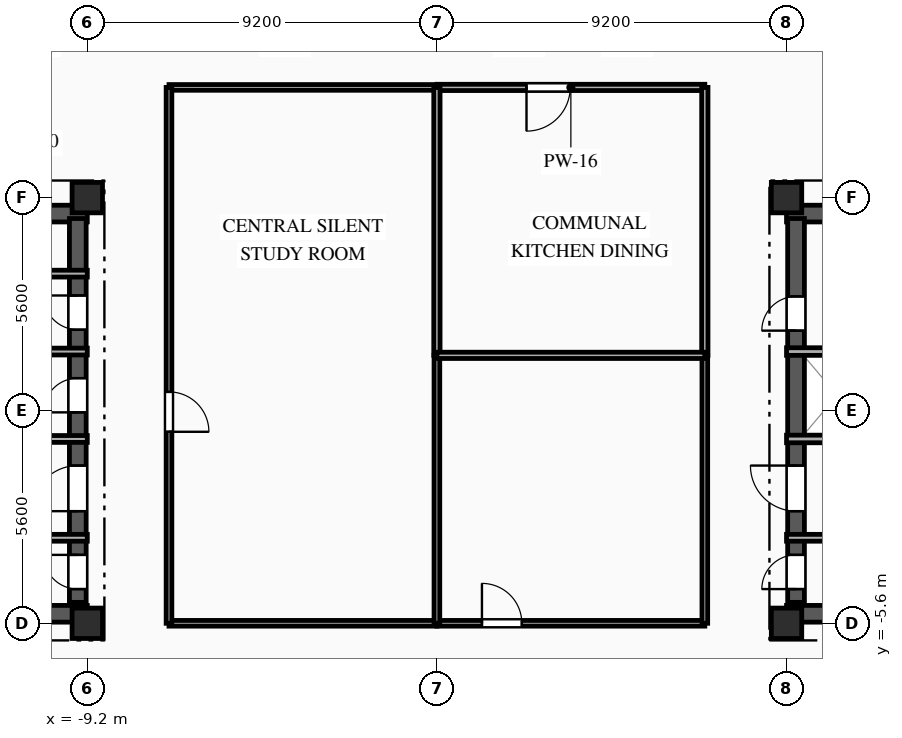
"""IFC4 building model, lengths in metres.
Left out: names, types, materials, properties, quantities, classifications, styles, units other than length and angle.
Written with IfcOpenShell. Run it as: python <this file> out.ifc"""

import sys

from ifc_helpers import new_model, si_unit, direction, frame, frame_2d, origin, origin_2d, place, context, subcontext, project, spatial, rectangle, extrude, element, fill, save


model = new_model("IFC4")
c1 = context("Model", 3, precision=1e-05, world=origin(), true_north=direction((0.0, 1.0)))
c2 = subcontext(c1, "Body", "Model", "MODEL_VIEW")
j1 = project(units=[si_unit("LENGTHUNIT", "METRE"), si_unit("PLANEANGLEUNIT", "RADIAN")], contexts=[c1])
p1 = place(None, origin())
s1 = spatial("IfcSite", under=j1, at=p1, CompositionType="ELEMENT")
p2 = place(p1, origin())
s2 = spatial("IfcBuilding", under=s1, at=p2, CompositionType="ELEMENT")
p3 = place(p2, frame((0.0, 0.0, 248.4)))
s3 = spatial("IfcBuildingStorey", under=s2, at=p3, CompositionType="ELEMENT", Elevation=248.4)
for number, where, z_axis, x_axis in (
    (1, (-9.2, -5.6, 0.0), (0.0, 0.0, 1.0), (1.0, 0.0, 0.0)),
    (2, (-9.2, 5.6, 0.0), (0.0, 0.0, 1.0), (1.0, 0.0, 0.0)),
    (3, (9.2, -5.6, 0.0), (0.0, 0.0, 1.0), (1.0, 0.0, 0.0)),
    (4, (9.2, 5.6, 0.0), (0.0, 0.0, 1.0), (1.0, 0.0, 0.0)),
):
    element("IfcColumn", number, at=place(p3, frame(where, z_axis=z_axis, x_axis=x_axis)), inside=s3, PredefinedType="COLUMN", context=c2, shape_type="SweptSolid", body=[
        extrude(rectangle(XDim=0.8, YDim=0.8, at=origin_2d()), origin(), (0.0, 0.0, 1.0), 3.35),
    ])
p4 = place(p3, frame((-18.8, 5.18, 0.0), z_axis=(0.0, 0.0, 1.0), x_axis=(1.0, 0.0, 0.0)))
e5 = element("IfcWall", 5, at=p4, inside=s3, PredefinedType="SHEAR", context=c2, shape_type="SweptSolid", body=[
    extrude(rectangle(XDim=9.6, YDim=0.44, at=frame_2d((4.8, 0.0))), origin(), (0.0, 0.0, 1.0), 3.04),
])
p5 = place(p4, frame((1.55, 0.0, 0.0)))
e6 = element("IfcOpeningElement", 6, at=p5, cuts=e5, PredefinedType="OPENING", context=c2, shape_type="SweptSolid", body=[
    extrude(rectangle(XDim=1.1, YDim=2.15, at=frame_2d((0.55, 1.075))), frame((0.0, 0.23, 0.0), z_axis=(0.0, -1.0, 0.0), x_axis=(1.0, 0.0, 0.0)), (0.0, 0.0, 1.0), 0.46),
])
p6 = place(p4, frame((4.775, 0.0, 0.0)))
e7 = element("IfcOpeningElement", 7, at=p6, cuts=e5, PredefinedType="OPENING", context=c2, shape_type="SweptSolid", body=[
    extrude(rectangle(XDim=1.05, YDim=2.1, at=frame_2d((0.525, 1.05))), frame((0.0, 0.23, 0.0), z_axis=(0.0, -1.0, 0.0), x_axis=(1.0, 0.0, 0.0)), (0.0, 0.0, 1.0), 0.46),
])
p7 = place(p3, frame((-18.8, -5.35, 0.0), z_axis=(0.0, 0.0, 1.0), x_axis=(1.0, 0.0, 0.0)))
e8 = element("IfcWall", 8, at=p7, inside=s3, PredefinedType="SHEAR", context=c2, shape_type="SweptSolid", body=[
    extrude(rectangle(XDim=9.6, YDim=0.44, at=frame_2d((4.8, 0.0))), origin(), (0.0, 0.0, 1.0), 3.04),
])
p8 = place(p7, frame((1.05, 0.0, 0.0)))
e9 = element("IfcOpeningElement", 9, at=p8, cuts=e8, PredefinedType="OPENING", context=c2, shape_type="SweptSolid", body=[
    extrude(rectangle(XDim=0.9, YDim=2.1, at=frame_2d((0.45, 1.05))), frame((0.0, 0.23, 0.0), z_axis=(0.0, -1.0, 0.0), x_axis=(1.0, 0.0, 0.0)), (0.0, 0.0, 1.0), 0.46),
])
p9 = place(p3, frame((-9.45, -5.05, 0.0), z_axis=(0.0, 0.0, 1.0), x_axis=(0.0, 1.0, 0.0)))
e10 = element("IfcWall", 10, at=p9, inside=s3, PredefinedType="SHEAR", context=c2, shape_type="SweptSolid", body=[
    extrude(rectangle(XDim=10.1, YDim=0.44, at=frame_2d((5.05, 0.0))), origin(), (0.0, 0.0, 1.0), 3.04),
])
p10 = place(p9, frame((7.175, 0.0, 0.0)))
e11 = element("IfcOpeningElement", 11, at=p10, cuts=e10, PredefinedType="OPENING", context=c2, shape_type="SweptSolid", body=[
    extrude(rectangle(XDim=0.9, YDim=2.1, at=frame_2d((0.45, 1.05))), frame((0.0, 0.23, 0.0), z_axis=(0.0, -1.0, 0.0), x_axis=(1.0, 0.0, 0.0)), (0.0, 0.0, 1.0), 0.46),
])
p11 = place(p9, frame((2.4, 0.0, 0.0)))
e12 = element("IfcOpeningElement", 12, at=p11, cuts=e10, PredefinedType="OPENING", context=c2, shape_type="SweptSolid", body=[
    extrude(rectangle(XDim=1.2, YDim=2.15, at=frame_2d((0.6, 1.075))), frame((0.0, 0.23, 0.0), z_axis=(0.0, -1.0, 0.0), x_axis=(1.0, 0.0, 0.0)), (0.0, 0.0, 1.0), 0.46),
])
p12 = place(p9, frame((0.35, 0.0, 0.0)))
e13 = element("IfcOpeningElement", 13, at=p12, cuts=e10, PredefinedType="OPENING", context=c2, shape_type="SweptSolid", body=[
    extrude(rectangle(XDim=0.9, YDim=2.1, at=frame_2d((0.45, 1.05))), frame((0.0, 0.23, 0.0), z_axis=(0.0, -1.0, 0.0), x_axis=(1.0, 0.0, 0.0)), (0.0, 0.0, 1.0), 0.46),
])
p13 = place(p9, frame((5.0, 0.0, 0.0)))
e14 = element("IfcOpeningElement", 14, at=p13, cuts=e10, PredefinedType="OPENING", context=c2, shape_type="SweptSolid", body=[
    extrude(rectangle(XDim=0.9, YDim=2.1, at=frame_2d((0.45, 1.05))), frame((0.0, 0.23, 0.0), z_axis=(0.0, -1.0, 0.0), x_axis=(1.0, 0.0, 0.0)), (0.0, 0.0, 1.0), 0.46),
])
p14 = place(p3, frame((9.2, 5.18, 0.0), z_axis=(0.0, 0.0, 1.0), x_axis=(1.0, 0.0, 0.0)))
e15 = element("IfcWall", 15, at=p14, inside=s3, PredefinedType="SHEAR", context=c2, shape_type="SweptSolid", body=[
    extrude(rectangle(XDim=9.6, YDim=0.44, at=frame_2d((4.8, 0.0))), origin(), (0.0, 0.0, 1.0), 3.04),
])
p15 = place(p14, frame((6.95, 0.0, 0.0)))
e16 = element("IfcOpeningElement", 16, at=p15, cuts=e15, PredefinedType="OPENING", context=c2, shape_type="SweptSolid", body=[
    extrude(rectangle(XDim=1.1, YDim=2.15, at=frame_2d((0.55, 1.075))), frame((0.0, 0.23, 0.0), z_axis=(0.0, -1.0, 0.0), x_axis=(1.0, 0.0, 0.0)), (0.0, 0.0, 1.0), 0.46),
])
p16 = place(p14, frame((3.775, 0.0, 0.0)))
e17 = element("IfcOpeningElement", 17, at=p16, cuts=e15, PredefinedType="OPENING", context=c2, shape_type="SweptSolid", body=[
    extrude(rectangle(XDim=1.05, YDim=2.1, at=frame_2d((0.525, 1.05))), frame((0.0, 0.23, 0.0), z_axis=(0.0, -1.0, 0.0), x_axis=(1.0, 0.0, 0.0)), (0.0, 0.0, 1.0), 0.46),
])
p17 = place(p3, frame((9.2, -5.35, 0.0), z_axis=(0.0, 0.0, 1.0), x_axis=(1.0, 0.0, 0.0)))
e18 = element("IfcWall", 18, at=p17, inside=s3, PredefinedType="SHEAR", context=c2, shape_type="SweptSolid", body=[
    extrude(rectangle(XDim=9.6, YDim=0.44, at=frame_2d((4.8, 0.0))), origin(), (0.0, 0.0, 1.0), 3.04),
])
p18 = place(p17, frame((7.65, 0.0, 0.0)))
e19 = element("IfcOpeningElement", 19, at=p18, cuts=e18, PredefinedType="OPENING", context=c2, shape_type="SweptSolid", body=[
    extrude(rectangle(XDim=0.9, YDim=2.1, at=frame_2d((0.45, 1.05))), frame((0.0, 0.23, 0.0), z_axis=(0.0, -1.0, 0.0), x_axis=(1.0, 0.0, 0.0)), (0.0, 0.0, 1.0), 0.46),
])
p19 = place(p3, frame((9.45, -5.05, 0.0), z_axis=(0.0, 0.0, 1.0), x_axis=(0.0, 1.0, 0.0)))
e20 = element("IfcWall", 20, at=p19, inside=s3, PredefinedType="SHEAR", context=c2, shape_type="SweptSolid", body=[
    extrude(rectangle(XDim=10.1, YDim=0.44, at=frame_2d((5.05, 0.0))), origin(), (0.0, 0.0, 1.0), 3.04),
])
p20 = place(p19, frame((7.15, 0.0, 0.0)))
e21 = element("IfcOpeningElement", 21, at=p20, cuts=e20, PredefinedType="OPENING", context=c2, shape_type="SweptSolid", body=[
    extrude(rectangle(XDim=0.9, YDim=2.1, at=frame_2d((0.45, 1.05))), frame((0.0, 0.23, 0.0), z_axis=(0.0, -1.0, 0.0), x_axis=(1.0, 0.0, 0.0)), (0.0, 0.0, 1.0), 0.46),
])
p21 = place(p19, frame((2.4, 0.0, 0.0)))
e22 = element("IfcOpeningElement", 22, at=p21, cuts=e20, PredefinedType="OPENING", context=c2, shape_type="SweptSolid", body=[
    extrude(rectangle(XDim=1.2, YDim=2.15, at=frame_2d((0.6, 1.075))), frame((0.0, 0.23, 0.0), z_axis=(0.0, -1.0, 0.0), x_axis=(1.0, 0.0, 0.0)), (0.0, 0.0, 1.0), 0.46),
])
p22 = place(p19, frame((0.35, 0.0, 0.0)))
e23 = element("IfcOpeningElement", 23, at=p22, cuts=e20, PredefinedType="OPENING", context=c2, shape_type="SweptSolid", body=[
    extrude(rectangle(XDim=0.9, YDim=2.1, at=frame_2d((0.45, 1.05))), frame((0.0, 0.23, 0.0), z_axis=(0.0, -1.0, 0.0), x_axis=(1.0, 0.0, 0.0)), (0.0, 0.0, 1.0), 0.46),
])
p23 = place(p3, frame((-9.2, 3.6, 0.0), z_axis=(0.0, 0.0, 1.0), x_axis=(-1.0, 0.0, 0.0)))
e24 = element("IfcWall", 24, at=p23, inside=s3, PredefinedType="PARTITIONING", context=c2, shape_type="SweptSolid", body=[
    extrude(rectangle(XDim=2.95, YDim=0.18, at=frame_2d((1.475, 0.0))), origin(), (0.0, 0.0, 1.0), 3.04),
])
p24 = place(p23, frame((1.7, 0.0, 0.0)))
e25 = element("IfcOpeningElement", 25, at=p24, cuts=e24, PredefinedType="OPENING", context=c2, shape_type="SweptSolid", body=[
    extrude(rectangle(XDim=0.9, YDim=2.1, at=frame_2d((0.45, 1.05))), frame((0.0, 0.1, 0.0), z_axis=(0.0, -1.0, 0.0), x_axis=(1.0, 0.0, 0.0)), (0.0, 0.0, 1.0), 0.2),
])
p25 = place(p3, frame((-12.15, 1.55, 0.0), z_axis=(0.0, 0.0, 1.0), x_axis=(1.0, 0.0, 0.0)))
e26 = element("IfcWall", 26, at=p25, inside=s3, PredefinedType="PARTITIONING", context=c2, shape_type="SweptSolid", body=[
    extrude(rectangle(XDim=2.95, YDim=0.18, at=frame_2d((1.475, 0.0))), origin(), (0.0, 0.0, 1.0), 3.04),
])
p26 = place(p3, frame((-15.05, -3.35, 0.0), z_axis=(0.0, 0.0, 1.0), x_axis=(1.0, 0.0, 0.0)))
e27 = element("IfcWall", 27, at=p26, inside=s3, PredefinedType="PARTITIONING", context=c2, shape_type="SweptSolid", body=[
    extrude(rectangle(XDim=5.85, YDim=0.18, at=frame_2d((2.925, 0.0))), origin(), (0.0, 0.0, 1.0), 2.755),
])
p27 = place(p3, frame((-9.2, -0.75, 0.0), z_axis=(0.0, 0.0, 1.0), x_axis=(-1.0, 0.0, 0.0)))
e28 = element("IfcWall", 28, at=p27, inside=s3, PredefinedType="PARTITIONING", context=c2, shape_type="SweptSolid", body=[
    extrude(rectangle(XDim=5.85, YDim=0.18, at=frame_2d((2.925, 0.0))), origin(), (0.0, 0.0, 1.0), 3.04),
])
p28 = place(p3, frame((9.2, -3.35, 0.0), z_axis=(0.0, 0.0, 1.0), x_axis=(1.0, 0.0, 0.0)))
e29 = element("IfcWall", 29, at=p28, inside=s3, PredefinedType="PARTITIONING", context=c2, shape_type="SweptSolid", body=[
    extrude(rectangle(XDim=5.82, YDim=0.18, at=frame_2d((2.91, 0.0))), origin(), (0.0, 0.0, 1.0), 2.755),
])
p29 = place(p3, frame((11.46, -0.75, 0.0), z_axis=(0.0, 0.0, 1.0), x_axis=(-1.0, 0.0, 0.0)))
e30 = element("IfcWall", 30, at=p29, inside=s3, PredefinedType="PARTITIONING", context=c2, shape_type="SweptSolid", body=[
    extrude(rectangle(XDim=2.26, YDim=0.2, at=frame_2d((1.13, 0.0))), origin(), (0.0, 0.0, 1.0), 3.04),
])
p30 = place(p3, frame((0.0, 8.5, 0.0), z_axis=(0.0, 0.0, 1.0), x_axis=(-1.0, 0.0, 0.0)))
e31 = element("IfcWall", 31, at=p30, inside=s3, PredefinedType="PARTITIONING", context=c2, shape_type="SweptSolid", body=[
    extrude(rectangle(XDim=7.05, YDim=0.15, at=frame_2d((3.525, 0.0))), origin(), (0.0, 0.0, 1.0), 3.04),
])
p31 = place(p3, frame((7.05, 8.5, 0.0), z_axis=(0.0, 0.0, 1.0), x_axis=(-1.0, 0.0, 0.0)))
e32 = element("IfcWall", 32, at=p31, inside=s3, PredefinedType="PARTITIONING", context=c2, shape_type="SweptSolid", body=[
    extrude(rectangle(XDim=7.05, YDim=0.165, at=frame_2d((3.525, 0.0))), origin(), (0.0, 0.0, 1.0), 3.04),
])
p32 = place(p31, frame((3.542, 0.0, 0.0)))
e33 = element("IfcOpeningElement", 33, at=p32, cuts=e32, PredefinedType="OPENING", context=c2, shape_type="SweptSolid", body=[
    extrude(rectangle(XDim=1.15, YDim=2.15, at=frame_2d((0.575, 1.075))), frame((0.0, 0.093, 0.0), z_axis=(0.0, -1.0, 0.0), x_axis=(1.0, 0.0, 0.0)), (0.0, 0.0, 1.0), 0.185),
])
p33 = place(p3, frame((-7.05, -5.6, 0.0), z_axis=(0.0, 0.0, 1.0), x_axis=(1.0, 0.0, 0.0)))
e34 = element("IfcWall", 34, at=p33, inside=s3, PredefinedType="PARTITIONING", context=c2, shape_type="SweptSolid", body=[
    extrude(rectangle(XDim=7.05, YDim=0.15, at=frame_2d((3.525, 0.0))), origin(), (0.0, 0.0, 1.0), 2.525),
])
p34 = place(p3, frame((0.0, -5.6, 0.0), z_axis=(0.0, 0.0, 1.0), x_axis=(1.0, 0.0, 0.0)))
e35 = element("IfcWall", 35, at=p34, inside=s3, PredefinedType="PARTITIONING", context=c2, shape_type="SweptSolid", body=[
    extrude(rectangle(XDim=7.05, YDim=0.15, at=frame_2d((3.525, 0.0))), origin(), (0.0, 0.0, 1.0), 2.525),
])
p35 = place(p34, frame((1.185, 0.0, 0.0)))
e36 = element("IfcOpeningElement", 36, at=p35, cuts=e35, PredefinedType="OPENING", context=c2, shape_type="SweptSolid", body=[
    extrude(rectangle(XDim=1.05, YDim=2.15, at=frame_2d((0.525, 1.075))), frame((0.0, 0.085, 0.0), z_axis=(0.0, -1.0, 0.0), x_axis=(1.0, 0.0, 0.0)), (0.0, 0.0, 1.0), 0.17),
])
p36 = place(p3, frame((-7.05, 8.5, 0.0), z_axis=(0.0, 0.0, 1.0), x_axis=(0.0, -1.0, 0.0)))
e37 = element("IfcWall", 37, at=p36, inside=s3, PredefinedType="PARTITIONING", context=c2, shape_type="SweptSolid", body=[
    extrude(rectangle(XDim=14.1, YDim=0.15, at=frame_2d((7.05, 0.0))), origin(), (0.0, 0.0, 1.0), 3.04),
])
p37 = place(p36, frame((8.011, 0.0, 0.0)))
e38 = element("IfcOpeningElement", 38, at=p37, cuts=e37, PredefinedType="OPENING", context=c2, shape_type="SweptSolid", body=[
    extrude(rectangle(XDim=1.05, YDim=2.15, at=frame_2d((0.525, 1.075))), frame((0.0, 0.085, 0.0), z_axis=(0.0, -1.0, 0.0), x_axis=(1.0, 0.0, 0.0)), (0.0, 0.0, 1.0), 0.17),
])
p38 = place(p3, frame((7.05, -5.6, 0.0), z_axis=(0.0, 0.0, 1.0), x_axis=(0.0, 1.0, 0.0)))
e39 = element("IfcWall", 39, at=p38, inside=s3, PredefinedType="PARTITIONING", context=c2, shape_type="SweptSolid", body=[
    extrude(rectangle(XDim=7.05, YDim=0.15, at=frame_2d((3.525, 0.0))), origin(), (0.0, 0.0, 1.0), 3.04),
])
p39 = place(p3, frame((7.05, 1.45, 0.0), z_axis=(0.0, 0.0, 1.0), x_axis=(0.0, 1.0, 0.0)))
e40 = element("IfcWall", 40, at=p39, inside=s3, PredefinedType="PARTITIONING", context=c2, shape_type="SweptSolid", body=[
    extrude(rectangle(XDim=7.05, YDim=0.165, at=frame_2d((3.525, 0.0))), origin(), (0.0, 0.0, 1.0), 3.04),
])
p40 = place(p3, frame((0.0, 1.45, 0.0), z_axis=(0.0, 0.0, 1.0), x_axis=(0.0, -1.0, 0.0)))
e41 = element("IfcWall", 41, at=p40, inside=s3, PredefinedType="PARTITIONING", context=c2, shape_type="SweptSolid", body=[
    extrude(rectangle(XDim=7.05, YDim=0.15, at=frame_2d((3.525, 0.0))), origin(), (0.0, 0.0, 1.0), 3.04),
])
for number, where, z_axis, x_axis in (
    (42, (0.0, 8.5, 0.0), (0.0, 0.0, 1.0), (0.0, -1.0, 0.0)),
    (43, (0.0, 1.45, 0.0), (0.0, 0.0, 1.0), (1.0, 0.0, 0.0)),
):
    element("IfcWall", number, at=place(p3, frame(where, z_axis=z_axis, x_axis=x_axis)), inside=s3, PredefinedType="PARTITIONING", context=c2, shape_type="SweptSolid", body=[
        extrude(rectangle(XDim=7.05, YDim=0.165, at=frame_2d((3.525, 0.0))), origin(), (0.0, 0.0, 1.0), 3.04),
    ])
p41 = place(p3, frame((9.2, 1.55, 0.0), z_axis=(0.0, 0.0, 1.0), x_axis=(1.0, 0.0, 0.0)))
e44 = element("IfcWall", 44, at=p41, inside=s3, PredefinedType="PARTITIONING", context=c2, shape_type="SweptSolid", body=[
    extrude(rectangle(XDim=5.82, YDim=0.2, at=frame_2d((2.91, 0.0))), origin(), (0.0, 0.0, 1.0), 3.04),
])
p42 = place(p10, origin())
e45 = element("IfcDoor", 45, at=p42, inside=s3, OperationType="SINGLE_SWING_RIGHT", PredefinedType="DOOR", context=c2, shape_type="SweptSolid", body=[
    extrude(rectangle(XDim=0.9, YDim=2.1, at=frame_2d((0.45, 1.05))), frame((0.0, 0.025, 0.0), z_axis=(0.0, -1.0, 0.0), x_axis=(1.0, 0.0, 0.0)), (0.0, 0.0, 1.0), 0.05),
])
fill(e11, e45)
p43 = place(p11, origin())
e46 = element("IfcDoor", 46, at=p43, inside=s3, OperationType="SINGLE_SWING_LEFT", PredefinedType="DOOR", context=c2, shape_type="SweptSolid", body=[
    extrude(rectangle(XDim=1.2, YDim=2.15, at=frame_2d((0.6, 1.075))), frame((0.0, 0.025, 0.0), z_axis=(0.0, -1.0, 0.0), x_axis=(1.0, 0.0, 0.0)), (0.0, 0.0, 1.0), 0.05),
])
fill(e12, e46)
p44 = place(p12, origin())
e47 = element("IfcDoor", 47, at=p44, inside=s3, OperationType="SINGLE_SWING_RIGHT", PredefinedType="DOOR", context=c2, shape_type="SweptSolid", body=[
    extrude(rectangle(XDim=0.9, YDim=2.1, at=frame_2d((0.45, 1.05))), frame((0.0, 0.025, 0.0), z_axis=(0.0, -1.0, 0.0), x_axis=(1.0, 0.0, 0.0)), (0.0, 0.0, 1.0), 0.05),
])
fill(e13, e47)
p45 = place(p13, origin())
e48 = element("IfcDoor", 48, at=p45, inside=s3, OperationType="SINGLE_SWING_LEFT", PredefinedType="DOOR", context=c2, shape_type="SweptSolid", body=[
    extrude(rectangle(XDim=0.9, YDim=2.1, at=frame_2d((0.45, 1.05))), frame((0.0, 0.025, 0.0), z_axis=(0.0, -1.0, 0.0), x_axis=(1.0, 0.0, 0.0)), (0.0, 0.0, 1.0), 0.05),
])
fill(e14, e48)
p46 = place(p20, origin())
e49 = element("IfcDoor", 49, at=p46, inside=s3, OperationType="SINGLE_SWING_LEFT", PredefinedType="DOOR", context=c2, shape_type="SweptSolid", body=[
    extrude(rectangle(XDim=0.9, YDim=2.1, at=frame_2d((0.45, 1.05))), frame((0.0, 0.025, 0.0), z_axis=(0.0, -1.0, 0.0), x_axis=(1.0, 0.0, 0.0)), (0.0, 0.0, 1.0), 0.05),
])
fill(e21, e49)
p47 = place(p21, origin())
e50 = element("IfcDoor", 50, at=p47, inside=s3, OperationType="SINGLE_SWING_RIGHT", PredefinedType="DOOR", context=c2, shape_type="SweptSolid", body=[
    extrude(rectangle(XDim=1.2, YDim=2.15, at=frame_2d((0.6, 1.075))), frame((0.0, 0.025, 0.0), z_axis=(0.0, -1.0, 0.0), x_axis=(1.0, 0.0, 0.0)), (0.0, 0.0, 1.0), 0.05),
])
fill(e22, e50)
p48 = place(p22, origin())
e51 = element("IfcDoor", 51, at=p48, inside=s3, OperationType="SINGLE_SWING_LEFT", PredefinedType="DOOR", context=c2, shape_type="SweptSolid", body=[
    extrude(rectangle(XDim=0.9, YDim=2.1, at=frame_2d((0.45, 1.05))), frame((0.0, 0.025, 0.0), z_axis=(0.0, -1.0, 0.0), x_axis=(1.0, 0.0, 0.0)), (0.0, 0.0, 1.0), 0.05),
])
fill(e23, e51)
p49 = place(p32, origin())
e52 = element("IfcDoor", 52, at=p49, inside=s3, OperationType="SINGLE_SWING_RIGHT", PredefinedType="DOOR", context=c2, shape_type="SweptSolid", body=[
    extrude(rectangle(XDim=1.15, YDim=2.15, at=frame_2d((0.575, 1.075))), frame((0.0, 0.025, 0.0), z_axis=(0.0, -1.0, 0.0), x_axis=(1.0, 0.0, 0.0)), (0.0, 0.0, 1.0), 0.05),
])
fill(e33, e52)
p50 = place(p35, origin())
e53 = element("IfcDoor", 53, at=p50, inside=s3, OperationType="SINGLE_SWING_LEFT", PredefinedType="DOOR", context=c2, shape_type="SweptSolid", body=[
    extrude(rectangle(XDim=1.05, YDim=2.15, at=frame_2d((0.525, 1.075))), frame((0.0, 0.025, 0.0), z_axis=(0.0, -1.0, 0.0), x_axis=(1.0, 0.0, 0.0)), (0.0, 0.0, 1.0), 0.05),
])
fill(e36, e53)
p51 = place(p37, origin())
e54 = element("IfcDoor", 54, at=p51, inside=s3, OperationType="SINGLE_SWING_RIGHT", PredefinedType="DOOR", context=c2, shape_type="SweptSolid", body=[
    extrude(rectangle(XDim=1.05, YDim=2.15, at=frame_2d((0.525, 1.075))), frame((0.0, 0.025, 0.0), z_axis=(0.0, -1.0, 0.0), x_axis=(1.0, 0.0, 0.0)), (0.0, 0.0, 1.0), 0.05),
])
fill(e38, e54)
save(model, sys.argv[1])
